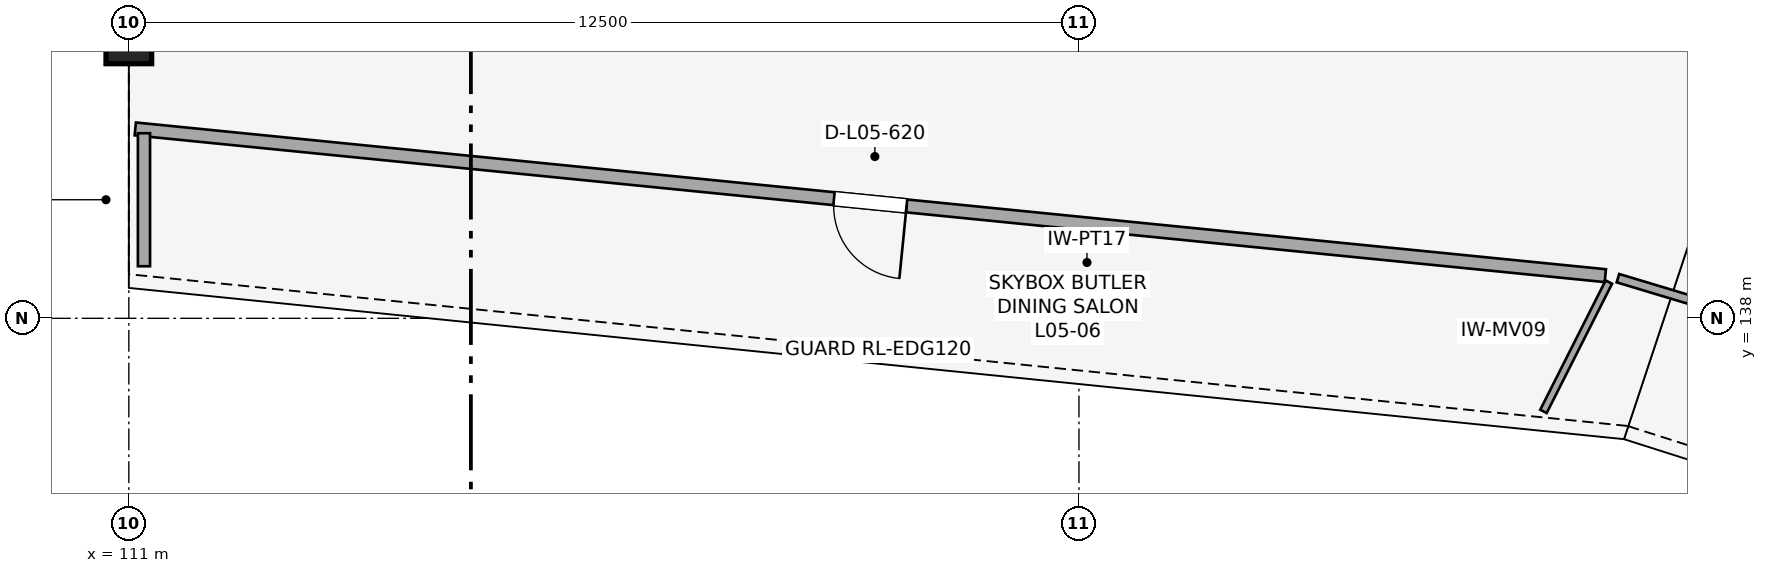
"""IFC4 building model, lengths in metres.
Left out: names, types, materials, properties, quantities, classifications, styles, units other than length and angle.
Written with IfcOpenShell. Run it as: python <this file> out.ifc"""

import sys

from ifc_helpers import new_model, si_unit, direction, frame, frame_2d, origin, origin_2d, place, context, subcontext, project, spatial, rectangle, i_section, extrude, element, fill, save


model = new_model("IFC4")
c1 = context("Model", 3, precision=1e-05, world=origin(), true_north=direction((0.0, 1.0)))
c2 = subcontext(c1, "Body", "Model", "MODEL_VIEW")
j1 = project(units=[si_unit("LENGTHUNIT", "METRE"), si_unit("PLANEANGLEUNIT", "RADIAN")], contexts=[c1])
p1 = place(None, origin())
s1 = spatial("IfcSite", under=j1, at=p1, CompositionType="ELEMENT")
p2 = place(p1, origin())
s2 = spatial("IfcBuilding", under=s1, at=p2, CompositionType="ELEMENT")
p3 = place(p2, frame((0.0, 0.0, 26.2)))
s3 = spatial("IfcBuildingStorey", under=s2, at=p3, CompositionType="ELEMENT", Elevation=26.2)
p4 = place(p3, frame((111.0, 141.5, 0.0), z_axis=(0.0, 0.0, 1.0), x_axis=(0.0, 1.0, 0.0)))
e1 = element("IfcColumn", 1, at=p4, inside=s3, PredefinedType="COLUMN", context=c2, shape_type="SweptSolid", body=[
    extrude(i_section(OverallWidth=0.3, OverallDepth=0.6, WebThickness=0.015, FlangeThickness=0.03, FilletRadius=0.027, at=origin_2d()), origin(), (0.0, 0.0, 1.0), 5.6),
])
p5 = place(p3, frame((137.611, 136.418, 0.0), z_axis=(0.0, 0.0, 1.0), x_axis=(-0.957653782183, 0.28792226984, 0.0)))
e2 = element("IfcWall", 2, at=p5, inside=s3, PredefinedType="MOVABLE", context=c2, shape_type="SweptSolid", body=[
    extrude(rectangle(XDim=7.33, YDim=0.115, at=frame_2d((3.665, 0.0))), origin(), (0.0, 0.0, 1.0), 4.1),
])
p6 = place(p5, frame((1.1, 0.0, 0.0)))
e3 = element("IfcOpeningElement", 3, at=p6, cuts=e2, PredefinedType="OPENING", context=c2, shape_type="SweptSolid", body=[
    extrude(rectangle(XDim=1.68, YDim=2.24, at=frame_2d((0.84, 1.12))), frame((0.0, 0.067, 0.0), z_axis=(0.0, -1.0, 0.0), x_axis=(1.0, 0.0, 0.0)), (0.0, 0.0, 1.0), 0.135),
])
p7 = place(p3, frame((129.611, 136.776, 0.0), z_axis=(0.0, 0.0, 1.0), x_axis=(0.45120504431, 0.892420309041, 0.0)))
e4 = element("IfcWall", 4, at=p7, inside=s3, PredefinedType="MOVABLE", context=c2, shape_type="SweptSolid", body=[
    extrude(rectangle(XDim=1.906, YDim=0.095, at=frame_2d((0.953, 0.0))), origin(), (0.0, 0.0, 1.0), 4.1),
])
p8 = place(p3, frame((130.425, 138.561, 0.0), z_axis=(0.0, 0.0, 1.0), x_axis=(-0.995054213973, 0.099333334058, 0.0)))
e5 = element("IfcWall", 5, at=p8, inside=s3, PredefinedType="PARTITIONING", context=c2, shape_type="SweptSolid", body=[
    extrude(rectangle(XDim=19.436, YDim=0.17, at=frame_2d((9.718, 0.0))), origin(), (0.0, 0.0, 1.0), 4.1),
])
p9 = place(p8, frame((9.238, 0.0, 0.0)))
e6 = element("IfcOpeningElement", 6, at=p9, cuts=e5, PredefinedType="OPENING", context=c2, shape_type="SweptSolid", body=[
    extrude(rectangle(XDim=0.96, YDim=2.38, at=frame_2d((0.48, 1.19))), frame((0.0, 0.095, 0.0), z_axis=(0.0, -1.0, 0.0), x_axis=(1.0, 0.0, 0.0)), (0.0, 0.0, 1.0), 0.19),
])
p10 = place(p3, frame((111.199, 138.685, 0.0), z_axis=(0.0, 0.0, 1.0), x_axis=(0.0, 1.0, 0.0)))
e7 = element("IfcWall", 7, at=p10, inside=s3, PredefinedType="PARTITIONING", context=c2, shape_type="SweptSolid", body=[
    extrude(rectangle(XDim=1.75, YDim=0.16, at=frame_2d((0.875, 0.0))), origin(), (0.0, 0.0, 1.0), 4.1),
])
p11 = place(p9, origin())
e8 = element("IfcDoor", 8, at=p11, inside=s3, OperationType="SINGLE_SWING_LEFT", PredefinedType="DOOR", context=c2, shape_type="SweptSolid", body=[
    extrude(rectangle(XDim=0.96, YDim=2.38, at=frame_2d((0.48, 1.19))), frame((0.0, 0.025, 0.0), z_axis=(0.0, -1.0, 0.0), x_axis=(1.0, 0.0, 0.0)), (0.0, 0.0, 1.0), 0.05),
])
fill(e6, e8)
save(model, sys.argv[1])
